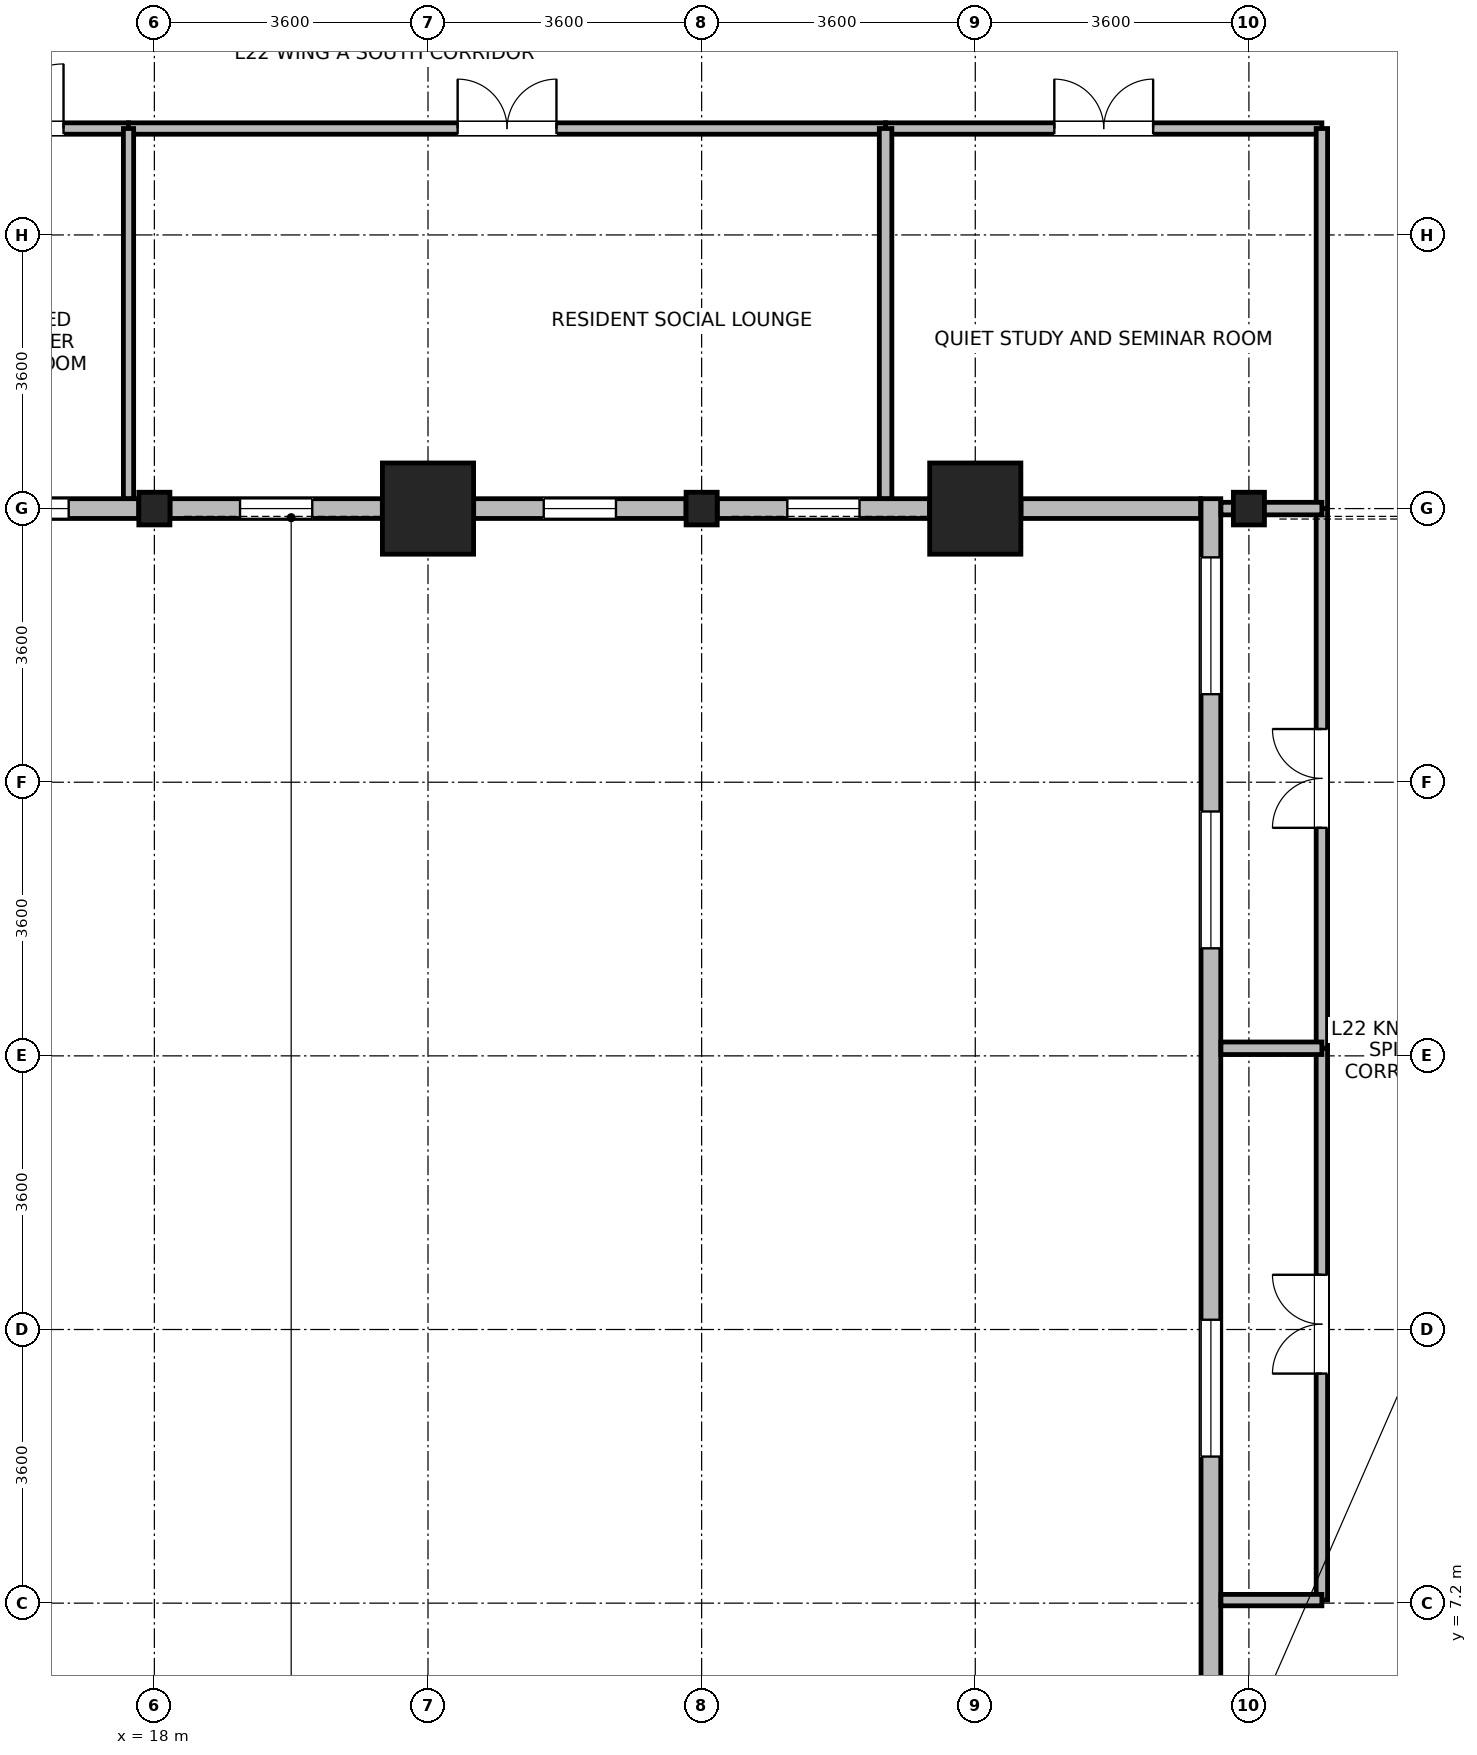
"""IFC4 building model, lengths in metres.
Left out: names, types, materials, properties, quantities, classifications, styles, units other than length and angle.
Written with IfcOpenShell. Run it as: python <this file> out.ifc"""

import sys

from ifc_helpers import new_model, si_unit, direction, frame, frame_2d, origin, origin_2d, place, context, subcontext, project, spatial, rectangle, i_section, extrude, source, transform, mapped, element, fill, save


model = new_model("IFC4")
c1 = context("Model", 3, precision=1e-05, world=origin(), true_north=direction((0.0, 1.0)))
c2 = subcontext(c1, "Body", "Model", "MODEL_VIEW")
j1 = project(units=[si_unit("LENGTHUNIT", "METRE"), si_unit("PLANEANGLEUNIT", "RADIAN")], contexts=[c1])
p1 = place(None, origin())
s1 = spatial("IfcSite", under=j1, at=p1, CompositionType="ELEMENT")
p2 = place(p1, origin())
s2 = spatial("IfcBuilding", under=s1, at=p2, CompositionType="ELEMENT")
p3 = place(p2, frame((0.0, 0.0, 89.7)))
s3 = spatial("IfcBuildingStorey", under=s2, at=p3, CompositionType="ELEMENT", Elevation=89.7)
m1 = source(origin(), c2, "Body", "SweptSolid", [
    extrude(rectangle(XDim=1.2, YDim=1.2, at=origin_2d()), origin(), (0.0, 0.0, 1.0), 3.7),
])
for number, where, z_axis, x_axis in (
    (1, (21.6, 21.6, 0.0), (0.0, 0.0, 1.0), (1.0, 0.0, 0.0)),
    (2, (28.8, 21.6, 0.0), (0.0, 0.0, 1.0), (1.0, 0.0, 0.0)),
):
    element("IfcColumn", number, at=place(p3, frame(where, z_axis=z_axis, x_axis=x_axis)), inside=s3, PredefinedType="COLUMN", context=c2, shape_type="MappedRepresentation", body=[
        mapped(m1, transform((0.0, 0.0, 0.0), x_axis=(1.0, 0.0, 0.0), y_axis=(0.0, 1.0, 0.0), z_axis=(0.0, 0.0, 1.0), scale=1.0)),
    ])
m2 = source(origin(), c2, "Body", "SweptSolid", [
    extrude(i_section(OverallWidth=0.409, OverallDepth=0.43, WebThickness=0.024, FlangeThickness=0.033, FilletRadius=0.015, at=origin_2d()), origin(), (0.0, 0.0, 1.0), 3.7),
])
for number, where, z_axis, x_axis in (
    (3, (18.0, 21.6, 0.0), (0.0, 0.0, 1.0), (1.0, 0.0, 0.0)),
    (4, (25.2, 21.6, 0.0), (0.0, 0.0, 1.0), (1.0, 0.0, 0.0)),
    (5, (32.4, 21.6, 0.0), (0.0, 0.0, 1.0), (1.0, 0.0, 0.0)),
):
    element("IfcColumn", number, at=place(p3, frame(where, z_axis=z_axis, x_axis=x_axis)), inside=s3, PredefinedType="COLUMN", context=c2, shape_type="MappedRepresentation", body=[
        mapped(m2, transform((0.0, 0.0, 0.0), x_axis=(1.0, 0.0, 0.0), y_axis=(0.0, 1.0, 0.0), z_axis=(0.0, 0.0, 1.0), scale=1.0)),
    ])
p4 = place(p3, frame((17.794, 21.6, 0.0), z_axis=(0.0, 0.0, 1.0), x_axis=(-1.0, 0.0, 0.0)))
e6 = element("IfcWall", 6, at=p4, inside=s3, PredefinedType="STANDARD", context=c2, shape_type="SweptSolid", body=[
    extrude(rectangle(XDim=2.793, YDim=0.26, at=frame_2d((1.397, 0.0))), origin(), (0.0, 0.0, 1.0), 2.93),
])
p5 = place(p4, frame((0.922, 0.0, 0.85)))
e7 = element("IfcOpeningElement", 7, at=p5, cuts=e6, PredefinedType="OPENING", context=c2, shape_type="SweptSolid", body=[
    extrude(rectangle(XDim=0.95, YDim=1.75, at=frame_2d((0.475, 0.875))), frame((0.0, 0.14, 0.0), z_axis=(0.0, -1.0, 0.0), x_axis=(1.0, 0.0, 0.0)), (0.0, 0.0, 1.0), 0.28),
])
p6 = place(p3, frame((20.999, 21.6, 0.0), z_axis=(0.0, 0.0, 1.0), x_axis=(-1.0, 0.0, 0.0)))
e8 = element("IfcWall", 8, at=p6, inside=s3, PredefinedType="STANDARD", context=c2, shape_type="SweptSolid", body=[
    extrude(rectangle(XDim=2.793, YDim=0.26, at=frame_2d((1.397, 0.0))), origin(), (0.0, 0.0, 1.0), 2.93),
])
p7 = place(p6, frame((0.922, 0.0, 0.85)))
e9 = element("IfcOpeningElement", 9, at=p7, cuts=e8, PredefinedType="OPENING", context=c2, shape_type="SweptSolid", body=[
    extrude(rectangle(XDim=0.95, YDim=1.75, at=frame_2d((0.475, 0.875))), frame((0.0, 0.14, 0.0), z_axis=(0.0, -1.0, 0.0), x_axis=(1.0, 0.0, 0.0)), (0.0, 0.0, 1.0), 0.28),
])
p8 = place(p3, frame((24.994, 21.6, 0.0), z_axis=(0.0, 0.0, 1.0), x_axis=(-1.0, 0.0, 0.0)))
e10 = element("IfcWall", 10, at=p8, inside=s3, PredefinedType="STANDARD", context=c2, shape_type="SweptSolid", body=[
    extrude(rectangle(XDim=2.793, YDim=0.26, at=frame_2d((1.397, 0.0))), origin(), (0.0, 0.0, 1.0), 2.93),
])
p9 = place(p8, frame((0.922, 0.0, 0.85)))
e11 = element("IfcOpeningElement", 11, at=p9, cuts=e10, PredefinedType="OPENING", context=c2, shape_type="SweptSolid", body=[
    extrude(rectangle(XDim=0.95, YDim=1.75, at=frame_2d((0.475, 0.875))), frame((0.0, 0.14, 0.0), z_axis=(0.0, -1.0, 0.0), x_axis=(1.0, 0.0, 0.0)), (0.0, 0.0, 1.0), 0.28),
])
p10 = place(p3, frame((28.199, 21.6, 0.0), z_axis=(0.0, 0.0, 1.0), x_axis=(-1.0, 0.0, 0.0)))
e12 = element("IfcWall", 12, at=p10, inside=s3, PredefinedType="STANDARD", context=c2, shape_type="SweptSolid", body=[
    extrude(rectangle(XDim=2.793, YDim=0.26, at=frame_2d((1.397, 0.0))), origin(), (0.0, 0.0, 1.0), 2.93),
])
p11 = place(p10, frame((0.922, 0.0, 0.85)))
e13 = element("IfcOpeningElement", 13, at=p11, cuts=e12, PredefinedType="OPENING", context=c2, shape_type="SweptSolid", body=[
    extrude(rectangle(XDim=0.95, YDim=1.75, at=frame_2d((0.475, 0.875))), frame((0.0, 0.14, 0.0), z_axis=(0.0, -1.0, 0.0), x_axis=(1.0, 0.0, 0.0)), (0.0, 0.0, 1.0), 0.28),
])
p12 = place(p3, frame((31.765, 21.6, 0.0), z_axis=(0.0, 0.0, 1.0), x_axis=(-1.0, 0.0, 0.0)))
e14 = element("IfcWall", 14, at=p12, inside=s3, PredefinedType="STANDARD", context=c2, shape_type="SweptSolid", body=[
    extrude(rectangle(XDim=2.364, YDim=0.26, at=frame_2d((1.182, 0.0))), origin(), (0.0, 0.0, 1.0), 2.93),
])
p13 = place(p3, frame((31.9, 1.67, 0.0), z_axis=(0.0, 0.0, 1.0), x_axis=(0.0, 1.0, 0.0)))
e15 = element("IfcWall", 15, at=p13, inside=s3, PredefinedType="STANDARD", context=c2, shape_type="SweptSolid", body=[
    extrude(rectangle(XDim=20.06, YDim=0.26, at=frame_2d((10.03, 0.0))), origin(), (0.0, 0.0, 1.0), 3.43),
])
p14 = place(p13, frame((0.772, 0.0, 0.85)))
e16 = element("IfcOpeningElement", 16, at=p14, cuts=e15, PredefinedType="OPENING", context=c2, shape_type="SweptSolid", body=[
    extrude(rectangle(XDim=1.8, YDim=1.85, at=frame_2d((0.9, 0.925))), frame((0.0, 0.14, 0.0), z_axis=(0.0, -1.0, 0.0), x_axis=(1.0, 0.0, 0.0)), (0.0, 0.0, 1.0), 0.28),
])
p15 = place(p13, frame((7.458, 0.0, 0.85)))
e17 = element("IfcOpeningElement", 17, at=p15, cuts=e15, PredefinedType="OPENING", context=c2, shape_type="SweptSolid", body=[
    extrude(rectangle(XDim=1.8, YDim=1.85, at=frame_2d((0.9, 0.925))), frame((0.0, 0.14, 0.0), z_axis=(0.0, -1.0, 0.0), x_axis=(1.0, 0.0, 0.0)), (0.0, 0.0, 1.0), 0.28),
])
p16 = place(p13, frame((14.145, 0.0, 0.85)))
e18 = element("IfcOpeningElement", 18, at=p16, cuts=e15, PredefinedType="OPENING", context=c2, shape_type="SweptSolid", body=[
    extrude(rectangle(XDim=1.8, YDim=1.85, at=frame_2d((0.9, 0.925))), frame((0.0, 0.14, 0.0), z_axis=(0.0, -1.0, 0.0), x_axis=(1.0, 0.0, 0.0)), (0.0, 0.0, 1.0), 0.28),
])
p17 = place(p13, frame((17.488, 0.0, 0.85)))
e19 = element("IfcOpeningElement", 19, at=p17, cuts=e15, PredefinedType="OPENING", context=c2, shape_type="SweptSolid", body=[
    extrude(rectangle(XDim=1.8, YDim=1.85, at=frame_2d((0.9, 0.925))), frame((0.0, 0.14, 0.0), z_axis=(0.0, -1.0, 0.0), x_axis=(1.0, 0.0, 0.0)), (0.0, 0.0, 1.0), 0.28),
])
p18 = place(p3, frame((17.66, 26.6, 0.0), z_axis=(0.0, 0.0, 1.0), x_axis=(1.0, 0.0, 0.0)))
e20 = element("IfcWall", 20, at=p18, inside=s3, PredefinedType="PARTITIONING", context=c2, shape_type="SweptSolid", body=[
    extrude(rectangle(XDim=9.96, YDim=0.15, at=frame_2d((4.98, 0.0))), origin(), (0.0, 0.0, 1.0), 3.43),
])
p19 = place(p18, frame((4.33, 0.0, 0.0)))
e21 = element("IfcOpeningElement", 21, at=p19, cuts=e20, PredefinedType="OPENING", context=c2, shape_type="SweptSolid", body=[
    extrude(rectangle(XDim=1.3, YDim=2.12, at=frame_2d((0.65, 1.06))), frame((0.0, 0.085, 0.0), z_axis=(0.0, -1.0, 0.0), x_axis=(1.0, 0.0, 0.0)), (0.0, 0.0, 1.0), 0.17),
])
p20 = place(p3, frame((33.36, 7.24, 0.0), z_axis=(0.0, 0.0, 1.0), x_axis=(0.0, 1.0, 0.0)))
e22 = element("IfcWall", 22, at=p20, inside=s3, PredefinedType="PARTITIONING", context=c2, shape_type="SweptSolid", body=[
    extrude(rectangle(XDim=7.26, YDim=0.15, at=frame_2d((3.63, 0.0))), origin(), (0.0, 0.0, 1.0), 3.43),
])
p21 = place(p20, frame((2.98, 0.0, 0.0)))
e23 = element("IfcOpeningElement", 23, at=p21, cuts=e22, PredefinedType="OPENING", context=c2, shape_type="SweptSolid", body=[
    extrude(rectangle(XDim=1.3, YDim=2.12, at=frame_2d((0.65, 1.06))), frame((0.0, 0.085, 0.0), z_axis=(0.0, -1.0, 0.0), x_axis=(1.0, 0.0, 0.0)), (0.0, 0.0, 1.0), 0.17),
])
p22 = place(p3, frame((33.36, 14.5, 0.0), z_axis=(0.0, 0.0, 1.0), x_axis=(0.0, 1.0, 0.0)))
e24 = element("IfcWall", 24, at=p22, inside=s3, PredefinedType="PARTITIONING", context=c2, shape_type="SweptSolid", body=[
    extrude(rectangle(XDim=7.1, YDim=0.15, at=frame_2d((3.55, 0.0))), origin(), (0.0, 0.0, 1.0), 3.43),
])
p23 = place(p22, frame((2.9, 0.0, 0.0)))
e25 = element("IfcOpeningElement", 25, at=p23, cuts=e24, PredefinedType="OPENING", context=c2, shape_type="SweptSolid", body=[
    extrude(rectangle(XDim=1.3, YDim=2.12, at=frame_2d((0.65, 1.06))), frame((0.0, 0.085, 0.0), z_axis=(0.0, -1.0, 0.0), x_axis=(1.0, 0.0, 0.0)), (0.0, 0.0, 1.0), 0.17),
])
p24 = place(p3, frame((27.62, 26.6, 0.0), z_axis=(0.0, 0.0, 1.0), x_axis=(1.0, 0.0, 0.0)))
e26 = element("IfcWall", 26, at=p24, inside=s3, PredefinedType="PARTITIONING", context=c2, shape_type="SweptSolid", body=[
    extrude(rectangle(XDim=5.74, YDim=0.15, at=frame_2d((2.87, 0.0))), origin(), (0.0, 0.0, 1.0), 3.43),
])
p25 = place(p24, frame((2.22, 0.0, 0.0)))
e27 = element("IfcOpeningElement", 27, at=p25, cuts=e26, PredefinedType="OPENING", context=c2, shape_type="SweptSolid", body=[
    extrude(rectangle(XDim=1.3, YDim=2.12, at=frame_2d((0.65, 1.06))), frame((0.0, 0.085, 0.0), z_axis=(0.0, -1.0, 0.0), x_axis=(1.0, 0.0, 0.0)), (0.0, 0.0, 1.0), 0.17),
])
p26 = place(p3, frame((33.36, 21.6, 0.0), z_axis=(0.0, 0.0, 1.0), x_axis=(0.0, 1.0, 0.0)))
e28 = element("IfcWall", 28, at=p26, inside=s3, PredefinedType="PARTITIONING", context=c2, shape_type="SweptSolid", body=[
    extrude(rectangle(XDim=5.0, YDim=0.15, at=frame_2d((2.5, 0.0))), origin(), (0.0, 0.0, 1.0), 3.43),
])
p27 = place(p3, frame((15.1, 26.6, 0.0), z_axis=(0.0, 0.0, 1.0), x_axis=(1.0, 0.0, 0.0)))
e29 = element("IfcWall", 29, at=p27, inside=s3, PredefinedType="PARTITIONING", context=c2, shape_type="SweptSolid", body=[
    extrude(rectangle(XDim=2.56, YDim=0.15, at=frame_2d((1.28, 0.0))), origin(), (0.0, 0.0, 1.0), 3.43),
])
p28 = place(p27, frame((0.855, 0.0, 0.0)))
e30 = element("IfcOpeningElement", 30, at=p28, cuts=e29, PredefinedType="OPENING", context=c2, shape_type="SweptSolid", body=[
    extrude(rectangle(XDim=0.85, YDim=2.04, at=frame_2d((0.425, 1.02))), frame((0.0, 0.085, 0.0), z_axis=(0.0, -1.0, 0.0), x_axis=(1.0, 0.0, 0.0)), (0.0, 0.0, 1.0), 0.17),
])
p29 = place(p3, frame((32.032, 7.24, 0.0), z_axis=(0.0, 0.0, 1.0), x_axis=(1.0, 0.0, 0.0)))
e31 = element("IfcWall", 31, at=p29, inside=s3, PredefinedType="PARTITIONING", context=c2, shape_type="SweptSolid", body=[
    extrude(rectangle(XDim=1.328, YDim=0.15, at=frame_2d((0.664, 0.0))), origin(), (0.0, 0.0, 1.0), 3.43),
])
p30 = place(p3, frame((17.66, 21.732, 0.0), z_axis=(0.0, 0.0, 1.0), x_axis=(0.0, 1.0, 0.0)))
e32 = element("IfcWall", 32, at=p30, inside=s3, PredefinedType="PARTITIONING", context=c2, shape_type="SweptSolid", body=[
    extrude(rectangle(XDim=4.868, YDim=0.135, at=frame_2d((2.434, 0.0))), origin(), (0.0, 0.0, 1.0), 3.43),
])
p31 = place(p3, frame((27.62, 21.732, 0.0), z_axis=(0.0, 0.0, 1.0), x_axis=(0.0, 1.0, 0.0)))
e33 = element("IfcWall", 33, at=p31, inside=s3, PredefinedType="PARTITIONING", context=c2, shape_type="SweptSolid", body=[
    extrude(rectangle(XDim=4.868, YDim=0.165, at=frame_2d((2.434, 0.0))), origin(), (0.0, 0.0, 1.0), 3.43),
])
p32 = place(p3, frame((32.032, 14.5, 0.0), z_axis=(0.0, 0.0, 1.0), x_axis=(1.0, 0.0, 0.0)))
e34 = element("IfcWall", 34, at=p32, inside=s3, PredefinedType="PARTITIONING", context=c2, shape_type="SweptSolid", body=[
    extrude(rectangle(XDim=1.328, YDim=0.165, at=frame_2d((0.664, 0.0))), origin(), (0.0, 0.0, 1.0), 3.43),
])
p33 = place(p3, frame((32.032, 21.6, 0.0), z_axis=(0.0, 0.0, 1.0), x_axis=(1.0, 0.0, 0.0)))
e35 = element("IfcWall", 35, at=p33, inside=s3, PredefinedType="PARTITIONING", context=c2, shape_type="SweptSolid", body=[
    extrude(rectangle(XDim=1.328, YDim=0.165, at=frame_2d((0.664, 0.0))), origin(), (0.0, 0.0, 1.0), 2.93),
])
p34 = place(p5, origin())
e36 = element("IfcWindow", 36, at=p34, inside=s3, PartitioningType="SINGLE_PANEL", PredefinedType="WINDOW", context=c2, shape_type="SweptSolid", body=[
    extrude(rectangle(XDim=0.95, YDim=1.75, at=frame_2d((0.475, 0.875))), frame((0.0, 0.03, 0.0), z_axis=(0.0, -1.0, 0.0), x_axis=(1.0, 0.0, 0.0)), (0.0, 0.0, 1.0), 0.06),
])
fill(e7, e36)
p35 = place(p7, origin())
e37 = element("IfcWindow", 37, at=p35, inside=s3, PartitioningType="SINGLE_PANEL", PredefinedType="WINDOW", context=c2, shape_type="SweptSolid", body=[
    extrude(rectangle(XDim=0.95, YDim=1.75, at=frame_2d((0.475, 0.875))), frame((0.0, 0.03, 0.0), z_axis=(0.0, -1.0, 0.0), x_axis=(1.0, 0.0, 0.0)), (0.0, 0.0, 1.0), 0.06),
])
fill(e9, e37)
p36 = place(p9, origin())
e38 = element("IfcWindow", 38, at=p36, inside=s3, PartitioningType="SINGLE_PANEL", PredefinedType="WINDOW", context=c2, shape_type="SweptSolid", body=[
    extrude(rectangle(XDim=0.95, YDim=1.75, at=frame_2d((0.475, 0.875))), frame((0.0, 0.03, 0.0), z_axis=(0.0, -1.0, 0.0), x_axis=(1.0, 0.0, 0.0)), (0.0, 0.0, 1.0), 0.06),
])
fill(e11, e38)
p37 = place(p11, origin())
e39 = element("IfcWindow", 39, at=p37, inside=s3, PartitioningType="SINGLE_PANEL", PredefinedType="WINDOW", context=c2, shape_type="SweptSolid", body=[
    extrude(rectangle(XDim=0.95, YDim=1.75, at=frame_2d((0.475, 0.875))), frame((0.0, 0.03, 0.0), z_axis=(0.0, -1.0, 0.0), x_axis=(1.0, 0.0, 0.0)), (0.0, 0.0, 1.0), 0.06),
])
fill(e13, e39)
p38 = place(p15, origin())
e40 = element("IfcWindow", 40, at=p38, inside=s3, PartitioningType="SINGLE_PANEL", PredefinedType="WINDOW", context=c2, shape_type="SweptSolid", body=[
    extrude(rectangle(XDim=1.8, YDim=1.85, at=frame_2d((0.9, 0.925))), frame((0.0, 0.03, 0.0), z_axis=(0.0, -1.0, 0.0), x_axis=(1.0, 0.0, 0.0)), (0.0, 0.0, 1.0), 0.06),
])
fill(e17, e40)
p39 = place(p16, origin())
e41 = element("IfcWindow", 41, at=p39, inside=s3, PartitioningType="SINGLE_PANEL", PredefinedType="WINDOW", context=c2, shape_type="SweptSolid", body=[
    extrude(rectangle(XDim=1.8, YDim=1.85, at=frame_2d((0.9, 0.925))), frame((0.0, 0.03, 0.0), z_axis=(0.0, -1.0, 0.0), x_axis=(1.0, 0.0, 0.0)), (0.0, 0.0, 1.0), 0.06),
])
fill(e18, e41)
p40 = place(p17, origin())
e42 = element("IfcWindow", 42, at=p40, inside=s3, PartitioningType="SINGLE_PANEL", PredefinedType="WINDOW", context=c2, shape_type="SweptSolid", body=[
    extrude(rectangle(XDim=1.8, YDim=1.85, at=frame_2d((0.9, 0.925))), frame((0.0, 0.03, 0.0), z_axis=(0.0, -1.0, 0.0), x_axis=(1.0, 0.0, 0.0)), (0.0, 0.0, 1.0), 0.06),
])
fill(e19, e42)
p41 = place(p19, origin())
e43 = element("IfcDoor", 43, at=p41, inside=s3, OperationType="DOUBLE_DOOR_SINGLE_SWING", PredefinedType="DOOR", context=c2, shape_type="SweptSolid", body=[
    extrude(rectangle(XDim=1.3, YDim=2.12, at=frame_2d((0.65, 1.06))), frame((0.0, 0.025, 0.0), z_axis=(0.0, -1.0, 0.0), x_axis=(1.0, 0.0, 0.0)), (0.0, 0.0, 1.0), 0.05),
])
fill(e21, e43)
p42 = place(p21, origin())
e44 = element("IfcDoor", 44, at=p42, inside=s3, OperationType="DOUBLE_DOOR_SINGLE_SWING", PredefinedType="DOOR", context=c2, shape_type="SweptSolid", body=[
    extrude(rectangle(XDim=1.3, YDim=2.12, at=frame_2d((0.65, 1.06))), frame((0.0, 0.025, 0.0), z_axis=(0.0, -1.0, 0.0), x_axis=(1.0, 0.0, 0.0)), (0.0, 0.0, 1.0), 0.05),
])
fill(e23, e44)
p43 = place(p23, origin())
e45 = element("IfcDoor", 45, at=p43, inside=s3, OperationType="DOUBLE_DOOR_SINGLE_SWING", PredefinedType="DOOR", context=c2, shape_type="SweptSolid", body=[
    extrude(rectangle(XDim=1.3, YDim=2.12, at=frame_2d((0.65, 1.06))), frame((0.0, 0.025, 0.0), z_axis=(0.0, -1.0, 0.0), x_axis=(1.0, 0.0, 0.0)), (0.0, 0.0, 1.0), 0.05),
])
fill(e25, e45)
p44 = place(p25, origin())
e46 = element("IfcDoor", 46, at=p44, inside=s3, OperationType="DOUBLE_DOOR_SINGLE_SWING", PredefinedType="DOOR", context=c2, shape_type="SweptSolid", body=[
    extrude(rectangle(XDim=1.3, YDim=2.12, at=frame_2d((0.65, 1.06))), frame((0.0, 0.025, 0.0), z_axis=(0.0, -1.0, 0.0), x_axis=(1.0, 0.0, 0.0)), (0.0, 0.0, 1.0), 0.05),
])
fill(e27, e46)
p45 = place(p28, origin())
e47 = element("IfcDoor", 47, at=p45, inside=s3, OperationType="SINGLE_SWING_RIGHT", PredefinedType="DOOR", context=c2, shape_type="SweptSolid", body=[
    extrude(rectangle(XDim=0.85, YDim=2.04, at=frame_2d((0.425, 1.02))), frame((0.0, 0.025, 0.0), z_axis=(0.0, -1.0, 0.0), x_axis=(1.0, 0.0, 0.0)), (0.0, 0.0, 1.0), 0.05),
])
fill(e30, e47)
save(model, sys.argv[1])
